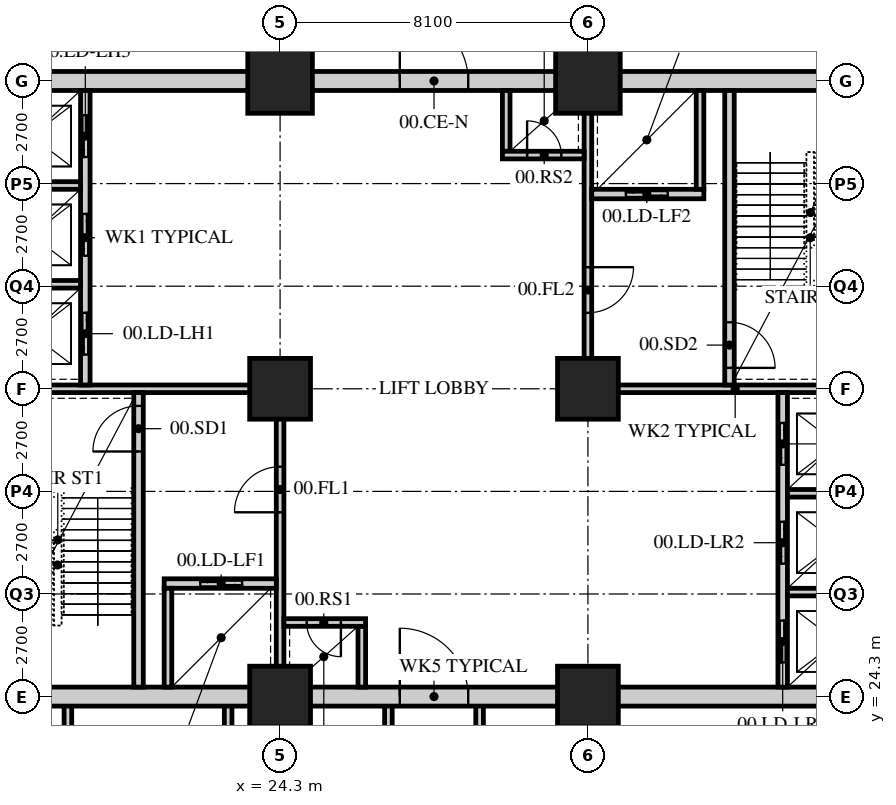
"""IFC4 building model, lengths in metres.
Left out: names, types, materials, properties, quantities, classifications, styles, units other than length and angle.
Written with IfcOpenShell. Run it as: python <this file> out.ifc"""

import sys

from ifc_helpers import new_model, si_unit, direction, frame, frame_2d, origin, origin_2d, place, context, subcontext, project, spatial, rectangle, hollow_rectangle, extrude, element, fill, save


model = new_model("IFC4")
c1 = context("Model", 3, precision=1e-05, world=origin(), true_north=direction((0.0, 1.0)))
c2 = subcontext(c1, "Body", "Model", "MODEL_VIEW")
j1 = project(units=[si_unit("LENGTHUNIT", "METRE"), si_unit("PLANEANGLEUNIT", "RADIAN")], contexts=[c1])
p1 = place(None, origin())
s1 = spatial("IfcSite", under=j1, at=p1, CompositionType="ELEMENT")
p2 = place(p1, origin())
s2 = spatial("IfcBuilding", under=s1, at=p2, CompositionType="ELEMENT")
p3 = place(p2, origin())
s3 = spatial("IfcBuildingStorey", under=s2, at=p3, CompositionType="ELEMENT", Elevation=0.0)
for number, where, z_axis, x_axis in (
    (1, (24.3, 24.3, 0.0), (0.0, 0.0, 1.0), (1.0, 0.0, 0.0)),
    (2, (24.3, 32.4, 0.0), (0.0, 0.0, 1.0), (1.0, 0.0, 0.0)),
):
    element("IfcColumn", number, at=place(p3, frame(where, z_axis=z_axis, x_axis=x_axis)), inside=s3, PredefinedType="COLUMN", context=c2, shape_type="SweptSolid", body=[
        extrude(hollow_rectangle(XDim=1.6, YDim=1.6, WallThickness=0.15, at=origin_2d()), origin(), (0.0, 0.0, 1.0), 6.0),
    ])
p4 = place(p3, frame((24.3, 40.5, 0.0), z_axis=(0.0, 0.0, 1.0), x_axis=(1.0, 0.0, 0.0)))
e3 = element("IfcColumn", 3, at=p4, inside=s3, PredefinedType="COLUMN", context=c2, shape_type="SweptSolid", body=[
    extrude(hollow_rectangle(XDim=1.7, YDim=1.7, WallThickness=0.16, at=origin_2d()), origin(), (0.0, 0.0, 1.0), 6.0),
])
for number, where, z_axis, x_axis in (
    (4, (32.4, 24.3, 0.0), (0.0, 0.0, 1.0), (1.0, 0.0, 0.0)),
    (5, (32.4, 32.4, 0.0), (0.0, 0.0, 1.0), (1.0, 0.0, 0.0)),
):
    element("IfcColumn", number, at=place(p3, frame(where, z_axis=z_axis, x_axis=x_axis)), inside=s3, PredefinedType="COLUMN", context=c2, shape_type="SweptSolid", body=[
        extrude(hollow_rectangle(XDim=1.6, YDim=1.6, WallThickness=0.15, at=origin_2d()), origin(), (0.0, 0.0, 1.0), 6.0),
    ])
p5 = place(p3, frame((32.4, 40.5, 0.0), z_axis=(0.0, 0.0, 1.0), x_axis=(1.0, 0.0, 0.0)))
e6 = element("IfcColumn", 6, at=p5, inside=s3, PredefinedType="COLUMN", context=c2, shape_type="SweptSolid", body=[
    extrude(hollow_rectangle(XDim=1.7, YDim=1.7, WallThickness=0.16, at=origin_2d()), origin(), (0.0, 0.0, 1.0), 6.0),
])
for number, where, z_axis, x_axis in (
    (7, (18.717, 3.6, 0.0), (0.0, 0.0, 1.0), (0.0, 1.0, 0.0)),
    (8, (22.933, 3.6, 0.0), (0.0, 0.0, 1.0), (0.0, 1.0, 0.0)),
    (9, (27.15, 3.6, 0.0), (0.0, 0.0, 1.0), (0.0, 1.0, 0.0)),
    (10, (29.55, 3.6, 0.0), (0.0, 0.0, 1.0), (0.0, 1.0, 0.0)),
):
    element("IfcWall", number, at=place(p3, frame(where, z_axis=z_axis, x_axis=x_axis)), inside=s3, PredefinedType="SOLIDWALL", context=c2, shape_type="SweptSolid", body=[
        extrude(rectangle(XDim=20.7, YDim=0.2, at=frame_2d((10.35, 0.0))), origin(), (0.0, 0.0, 1.0), 5.75),
    ])
p6 = place(p3, frame((15.95, 24.3, 0.0), z_axis=(0.0, 0.0, 1.0), x_axis=(1.0, 0.0, 0.0)))
e11 = element("IfcWall", 11, at=p6, inside=s3, PredefinedType="SOLIDWALL", context=c2, shape_type="SweptSolid", body=[
    extrude(rectangle(XDim=24.8, YDim=0.5, at=frame_2d((12.4, 0.0))), origin(), (0.0, 0.0, 1.0), 5.1),
])
p7 = place(p6, frame((11.5, 0.0, 0.0)))
e12 = element("IfcOpeningElement", 12, at=p7, cuts=e11, PredefinedType="OPENING", context=c2, shape_type="SweptSolid", body=[
    extrude(rectangle(XDim=1.8, YDim=2.4, at=frame_2d((0.9, 1.2))), frame((0.0, 0.26, 0.0), z_axis=(0.0, -1.0, 0.0), x_axis=(1.0, 0.0, 0.0)), (0.0, 0.0, 1.0), 0.52),
])
p8 = place(p3, frame((15.95, 40.5, 0.0), z_axis=(0.0, 0.0, 1.0), x_axis=(1.0, 0.0, 0.0)))
e13 = element("IfcWall", 13, at=p8, inside=s3, PredefinedType="SOLIDWALL", context=c2, shape_type="SweptSolid", body=[
    extrude(rectangle(XDim=24.8, YDim=0.5, at=frame_2d((12.4, 0.0))), origin(), (0.0, 0.0, 1.0), 5.1),
])
p9 = place(p8, frame((11.5, 0.0, 0.0)))
e14 = element("IfcOpeningElement", 14, at=p9, cuts=e13, PredefinedType="OPENING", context=c2, shape_type="SweptSolid", body=[
    extrude(rectangle(XDim=1.8, YDim=2.4, at=frame_2d((0.9, 1.2))), frame((0.0, 0.26, 0.0), z_axis=(0.0, -1.0, 0.0), x_axis=(1.0, 0.0, 0.0)), (0.0, 0.0, 1.0), 0.52),
])
p10 = place(p3, frame((16.45, 32.4, 0.0), z_axis=(0.0, 0.0, 1.0), x_axis=(1.0, 0.0, 0.0)))
e15 = element("IfcWall", 15, at=p10, inside=s3, PredefinedType="SOLIDWALL", context=c2, shape_type="SweptSolid", body=[
    extrude(rectangle(XDim=7.95, YDim=0.2, at=frame_2d((3.975, 0.0))), origin(), (0.0, 0.0, 1.0), 5.05),
])
p11 = place(p3, frame((24.3, 24.55, 0.0), z_axis=(0.0, 0.0, 1.0), x_axis=(0.0, 1.0, 0.0)))
e16 = element("IfcWall", 16, at=p11, inside=s3, PredefinedType="SOLIDWALL", context=c2, shape_type="SweptSolid", body=[
    extrude(rectangle(XDim=7.75, YDim=0.2, at=frame_2d((3.875, 0.0))), origin(), (0.0, 0.0, 1.0), 5.05),
])
p12 = place(p11, frame((4.6, 0.0, 0.0)))
e17 = element("IfcOpeningElement", 17, at=p12, cuts=e16, PredefinedType="OPENING", context=c2, shape_type="SweptSolid", body=[
    extrude(rectangle(XDim=1.2, YDim=2.1, at=frame_2d((0.6, 1.05))), frame((0.0, 0.11, 0.0), z_axis=(0.0, -1.0, 0.0), x_axis=(1.0, 0.0, 0.0)), (0.0, 0.0, 1.0), 0.22),
])
p13 = place(p3, frame((20.575, 24.55, 0.0), z_axis=(0.0, 0.0, 1.0), x_axis=(0.0, 1.0, 0.0)))
e18 = element("IfcWall", 18, at=p13, inside=s3, PredefinedType="SOLIDWALL", context=c2, shape_type="SweptSolid", body=[
    extrude(rectangle(XDim=7.75, YDim=0.25, at=frame_2d((3.875, 0.0))), origin(), (0.0, 0.0, 1.0), 5.75),
])
p14 = place(p13, frame((6.2, 0.0, 0.0)))
e19 = element("IfcOpeningElement", 19, at=p14, cuts=e18, PredefinedType="OPENING", context=c2, shape_type="SweptSolid", body=[
    extrude(rectangle(XDim=1.2, YDim=2.1, at=frame_2d((0.6, 1.05))), frame((0.0, 0.135, 0.0), z_axis=(0.0, -1.0, 0.0), x_axis=(1.0, 0.0, 0.0)), (0.0, 0.0, 1.0), 0.27),
])
p15 = place(p3, frame((21.25, 27.275, 0.0), z_axis=(0.0, 0.0, 1.0), x_axis=(1.0, 0.0, 0.0)))
e20 = element("IfcWall", 20, at=p15, inside=s3, PredefinedType="SOLIDWALL", context=c2, shape_type="SweptSolid", body=[
    extrude(rectangle(XDim=2.95, YDim=0.25, at=frame_2d((1.475, 0.0))), origin(), (0.0, 0.0, 1.0), 5.75),
])
p16 = place(p15, frame((0.95, 0.0, 0.0)))
e21 = element("IfcOpeningElement", 21, at=p16, cuts=e20, PredefinedType="OPENING", context=c2, shape_type="SweptSolid", body=[
    extrude(rectangle(XDim=1.1, YDim=2.4, at=frame_2d((0.55, 1.2))), frame((0.0, 0.135, 0.0), z_axis=(0.0, -1.0, 0.0), x_axis=(1.0, 0.0, 0.0)), (0.0, 0.0, 1.0), 0.27),
])
p17 = place(p3, frame((21.35, 24.55, 0.0), z_axis=(0.0, 0.0, 1.0), x_axis=(0.0, 1.0, 0.0)))
e22 = element("IfcWall", 22, at=p17, inside=s3, PredefinedType="SOLIDWALL", context=c2, shape_type="SweptSolid", body=[
    extrude(rectangle(XDim=2.6, YDim=0.2, at=frame_2d((1.3, 0.0))), origin(), (0.0, 0.0, 1.0), 5.75),
])
p18 = place(p3, frame((19.175, 32.5, 0.0), z_axis=(0.0, 0.0, 1.0), x_axis=(0.0, 1.0, 0.0)))
e23 = element("IfcWall", 23, at=p18, inside=s3, PredefinedType="SOLIDWALL", context=c2, shape_type="SweptSolid", body=[
    extrude(rectangle(XDim=7.75, YDim=0.25, at=frame_2d((3.875, 0.0))), origin(), (0.0, 0.0, 1.0), 5.75),
])
p19 = place(p18, frame((0.8, 0.0, 0.0)))
e24 = element("IfcOpeningElement", 24, at=p19, cuts=e23, PredefinedType="OPENING", context=c2, shape_type="SweptSolid", body=[
    extrude(rectangle(XDim=1.1, YDim=2.4, at=frame_2d((0.55, 1.2))), frame((0.0, 0.135, 0.0), z_axis=(0.0, -1.0, 0.0), x_axis=(1.0, 0.0, 0.0)), (0.0, 0.0, 1.0), 0.27),
])
p20 = place(p18, frame((3.4, 0.0, 0.0)))
e25 = element("IfcOpeningElement", 25, at=p20, cuts=e23, PredefinedType="OPENING", context=c2, shape_type="SweptSolid", body=[
    extrude(rectangle(XDim=1.1, YDim=2.4, at=frame_2d((0.55, 1.2))), frame((0.0, 0.135, 0.0), z_axis=(0.0, -1.0, 0.0), x_axis=(1.0, 0.0, 0.0)), (0.0, 0.0, 1.0), 0.27),
])
p21 = place(p18, frame((6.0, 0.0, 0.0)))
e26 = element("IfcOpeningElement", 26, at=p21, cuts=e23, PredefinedType="OPENING", context=c2, shape_type="SweptSolid", body=[
    extrude(rectangle(XDim=1.1, YDim=2.4, at=frame_2d((0.55, 1.2))), frame((0.0, 0.135, 0.0), z_axis=(0.0, -1.0, 0.0), x_axis=(1.0, 0.0, 0.0)), (0.0, 0.0, 1.0), 0.27),
])
for number, where, z_axis, x_axis in (
    (27, (16.45, 35.15, 0.0), (0.0, 0.0, 1.0), (1.0, 0.0, 0.0)),
    (28, (16.45, 37.75, 0.0), (0.0, 0.0, 1.0), (1.0, 0.0, 0.0)),
):
    element("IfcWall", number, at=place(p3, frame(where, z_axis=z_axis, x_axis=x_axis)), inside=s3, PredefinedType="SOLIDWALL", context=c2, shape_type="SweptSolid", body=[
        extrude(rectangle(XDim=2.6, YDim=0.2, at=frame_2d((1.3, 0.0))), origin(), (0.0, 0.0, 1.0), 5.75),
    ])
p22 = place(p3, frame((26.45, 24.55, 0.0), z_axis=(0.0, 0.0, 1.0), x_axis=(0.0, 1.0, 0.0)))
e29 = element("IfcWall", 29, at=p22, inside=s3, PredefinedType="SOLIDWALL", context=c2, shape_type="SweptSolid", body=[
    extrude(rectangle(XDim=1.6, YDim=0.2, at=frame_2d((0.8, 0.0))), origin(), (0.0, 0.0, 1.0), 5.75),
])
p23 = place(p3, frame((24.4, 26.25, 0.0), z_axis=(0.0, 0.0, 1.0), x_axis=(1.0, 0.0, 0.0)))
e30 = element("IfcWall", 30, at=p23, inside=s3, PredefinedType="SOLIDWALL", context=c2, shape_type="SweptSolid", body=[
    extrude(rectangle(XDim=2.15, YDim=0.2, at=frame_2d((1.075, 0.0))), origin(), (0.0, 0.0, 1.0), 5.75),
])
p24 = place(p23, frame((0.6, 0.0, 0.0)))
e31 = element("IfcOpeningElement", 31, at=p24, cuts=e30, PredefinedType="OPENING", context=c2, shape_type="SweptSolid", body=[
    extrude(rectangle(XDim=0.9, YDim=2.1, at=frame_2d((0.45, 1.05))), frame((0.0, 0.11, 0.0), z_axis=(0.0, -1.0, 0.0), x_axis=(1.0, 0.0, 0.0)), (0.0, 0.0, 1.0), 0.22),
])
p25 = place(p3, frame((32.3, 32.4, 0.0), z_axis=(0.0, 0.0, 1.0), x_axis=(1.0, 0.0, 0.0)))
e32 = element("IfcWall", 32, at=p25, inside=s3, PredefinedType="SOLIDWALL", context=c2, shape_type="SweptSolid", body=[
    extrude(rectangle(XDim=7.95, YDim=0.2, at=frame_2d((3.975, 0.0))), origin(), (0.0, 0.0, 1.0), 5.05),
])
p26 = place(p3, frame((32.4, 32.5, 0.0), z_axis=(0.0, 0.0, 1.0), x_axis=(0.0, 1.0, 0.0)))
e33 = element("IfcWall", 33, at=p26, inside=s3, PredefinedType="SOLIDWALL", context=c2, shape_type="SweptSolid", body=[
    extrude(rectangle(XDim=7.75, YDim=0.2, at=frame_2d((3.875, 0.0))), origin(), (0.0, 0.0, 1.0), 5.05),
])
p27 = place(p26, frame((1.9, 0.0, 0.0)))
e34 = element("IfcOpeningElement", 34, at=p27, cuts=e33, PredefinedType="OPENING", context=c2, shape_type="SweptSolid", body=[
    extrude(rectangle(XDim=1.2, YDim=2.1, at=frame_2d((0.6, 1.05))), frame((0.0, 0.11, 0.0), z_axis=(0.0, -1.0, 0.0), x_axis=(1.0, 0.0, 0.0)), (0.0, 0.0, 1.0), 0.22),
])
p28 = place(p3, frame((37.525, 24.55, 0.0), z_axis=(0.0, 0.0, 1.0), x_axis=(0.0, 1.0, 0.0)))
e35 = element("IfcWall", 35, at=p28, inside=s3, PredefinedType="SOLIDWALL", context=c2, shape_type="SweptSolid", body=[
    extrude(rectangle(XDim=7.75, YDim=0.25, at=frame_2d((3.875, 0.0))), origin(), (0.0, 0.0, 1.0), 5.75),
])
p29 = place(p28, frame((0.65, 0.0, 0.0)))
e36 = element("IfcOpeningElement", 36, at=p29, cuts=e35, PredefinedType="OPENING", context=c2, shape_type="SweptSolid", body=[
    extrude(rectangle(XDim=1.1, YDim=2.4, at=frame_2d((0.55, 1.2))), frame((0.0, 0.135, 0.0), z_axis=(0.0, -1.0, 0.0), x_axis=(1.0, 0.0, 0.0)), (0.0, 0.0, 1.0), 0.27),
])
p30 = place(p28, frame((3.25, 0.0, 0.0)))
e37 = element("IfcOpeningElement", 37, at=p30, cuts=e35, PredefinedType="OPENING", context=c2, shape_type="SweptSolid", body=[
    extrude(rectangle(XDim=1.1, YDim=2.4, at=frame_2d((0.55, 1.2))), frame((0.0, 0.135, 0.0), z_axis=(0.0, -1.0, 0.0), x_axis=(1.0, 0.0, 0.0)), (0.0, 0.0, 1.0), 0.27),
])
p31 = place(p28, frame((5.85, 0.0, 0.0)))
e38 = element("IfcOpeningElement", 38, at=p31, cuts=e35, PredefinedType="OPENING", context=c2, shape_type="SweptSolid", body=[
    extrude(rectangle(XDim=1.1, YDim=2.4, at=frame_2d((0.55, 1.2))), frame((0.0, 0.135, 0.0), z_axis=(0.0, -1.0, 0.0), x_axis=(1.0, 0.0, 0.0)), (0.0, 0.0, 1.0), 0.27),
])
for number, where, z_axis, x_axis in (
    (39, (37.65, 27.05, 0.0), (0.0, 0.0, 1.0), (1.0, 0.0, 0.0)),
    (40, (37.65, 29.65, 0.0), (0.0, 0.0, 1.0), (1.0, 0.0, 0.0)),
):
    element("IfcWall", number, at=place(p3, frame(where, z_axis=z_axis, x_axis=x_axis)), inside=s3, PredefinedType="SOLIDWALL", context=c2, shape_type="SweptSolid", body=[
        extrude(rectangle(XDim=2.6, YDim=0.2, at=frame_2d((1.3, 0.0))), origin(), (0.0, 0.0, 1.0), 5.75),
    ])
p32 = place(p3, frame((36.125, 32.5, 0.0), z_axis=(0.0, 0.0, 1.0), x_axis=(0.0, 1.0, 0.0)))
e41 = element("IfcWall", 41, at=p32, inside=s3, PredefinedType="SOLIDWALL", context=c2, shape_type="SweptSolid", body=[
    extrude(rectangle(XDim=7.75, YDim=0.25, at=frame_2d((3.875, 0.0))), origin(), (0.0, 0.0, 1.0), 5.75),
])
p33 = place(p32, frame((0.45, 0.0, 0.0)))
e42 = element("IfcOpeningElement", 42, at=p33, cuts=e41, PredefinedType="OPENING", context=c2, shape_type="SweptSolid", body=[
    extrude(rectangle(XDim=1.2, YDim=2.1, at=frame_2d((0.6, 1.05))), frame((0.0, 0.135, 0.0), z_axis=(0.0, -1.0, 0.0), x_axis=(1.0, 0.0, 0.0)), (0.0, 0.0, 1.0), 0.27),
])
p34 = place(p3, frame((32.5, 37.525, 0.0), z_axis=(0.0, 0.0, 1.0), x_axis=(1.0, 0.0, 0.0)))
e43 = element("IfcWall", 43, at=p34, inside=s3, PredefinedType="SOLIDWALL", context=c2, shape_type="SweptSolid", body=[
    extrude(rectangle(XDim=2.95, YDim=0.25, at=frame_2d((1.475, 0.0))), origin(), (0.0, 0.0, 1.0), 5.75),
])
p35 = place(p34, frame((0.9, 0.0, 0.0)))
e44 = element("IfcOpeningElement", 44, at=p35, cuts=e43, PredefinedType="OPENING", context=c2, shape_type="SweptSolid", body=[
    extrude(rectangle(XDim=1.1, YDim=2.4, at=frame_2d((0.55, 1.2))), frame((0.0, 0.135, 0.0), z_axis=(0.0, -1.0, 0.0), x_axis=(1.0, 0.0, 0.0)), (0.0, 0.0, 1.0), 0.27),
])
p36 = place(p3, frame((35.35, 37.65, 0.0), z_axis=(0.0, 0.0, 1.0), x_axis=(0.0, 1.0, 0.0)))
e45 = element("IfcWall", 45, at=p36, inside=s3, PredefinedType="SOLIDWALL", context=c2, shape_type="SweptSolid", body=[
    extrude(rectangle(XDim=2.6, YDim=0.2, at=frame_2d((1.3, 0.0))), origin(), (0.0, 0.0, 1.0), 5.75),
])
p37 = place(p3, frame((30.25, 38.65, 0.0), z_axis=(0.0, 0.0, 1.0), x_axis=(0.0, 1.0, 0.0)))
e46 = element("IfcWall", 46, at=p37, inside=s3, PredefinedType="SOLIDWALL", context=c2, shape_type="SweptSolid", body=[
    extrude(rectangle(XDim=1.6, YDim=0.2, at=frame_2d((0.8, 0.0))), origin(), (0.0, 0.0, 1.0), 5.75),
])
p38 = place(p3, frame((30.15, 38.55, 0.0), z_axis=(0.0, 0.0, 1.0), x_axis=(1.0, 0.0, 0.0)))
e47 = element("IfcWall", 47, at=p38, inside=s3, PredefinedType="SOLIDWALL", context=c2, shape_type="SweptSolid", body=[
    extrude(rectangle(XDim=2.15, YDim=0.2, at=frame_2d((1.075, 0.0))), origin(), (0.0, 0.0, 1.0), 5.75),
])
p39 = place(p38, frame((0.65, 0.0, 0.0)))
e48 = element("IfcOpeningElement", 48, at=p39, cuts=e47, PredefinedType="OPENING", context=c2, shape_type="SweptSolid", body=[
    extrude(rectangle(XDim=0.9, YDim=2.1, at=frame_2d((0.45, 1.05))), frame((0.0, 0.11, 0.0), z_axis=(0.0, -1.0, 0.0), x_axis=(1.0, 0.0, 0.0)), (0.0, 0.0, 1.0), 0.22),
])
p40 = place(p14, origin())
e49 = element("IfcDoor", 49, at=p40, inside=s3, OperationType="SINGLE_SWING_LEFT", PredefinedType="DOOR", context=c2, shape_type="SweptSolid", body=[
    extrude(rectangle(XDim=1.2, YDim=2.1, at=frame_2d((0.6, 1.05))), frame((0.0, 0.025, 0.0), z_axis=(0.0, -1.0, 0.0), x_axis=(1.0, 0.0, 0.0)), (0.0, 0.0, 1.0), 0.05),
])
fill(e19, e49)
p41 = place(p12, origin())
e50 = element("IfcDoor", 50, at=p41, inside=s3, OperationType="SINGLE_SWING_LEFT", PredefinedType="DOOR", context=c2, shape_type="SweptSolid", body=[
    extrude(rectangle(XDim=1.2, YDim=2.1, at=frame_2d((0.6, 1.05))), frame((0.0, 0.025, 0.0), z_axis=(0.0, -1.0, 0.0), x_axis=(1.0, 0.0, 0.0)), (0.0, 0.0, 1.0), 0.05),
])
fill(e17, e50)
p42 = place(p24, origin())
e51 = element("IfcDoor", 51, at=p42, inside=s3, OperationType="SINGLE_SWING_LEFT", PredefinedType="DOOR", context=c2, shape_type="SweptSolid", body=[
    extrude(rectangle(XDim=0.9, YDim=2.1, at=frame_2d((0.45, 1.05))), frame((0.0, 0.025, 0.0), z_axis=(0.0, -1.0, 0.0), x_axis=(1.0, 0.0, 0.0)), (0.0, 0.0, 1.0), 0.05),
])
fill(e31, e51)
p43 = place(p33, origin())
e52 = element("IfcDoor", 52, at=p43, inside=s3, OperationType="SINGLE_SWING_RIGHT", PredefinedType="DOOR", context=c2, shape_type="SweptSolid", body=[
    extrude(rectangle(XDim=1.2, YDim=2.1, at=frame_2d((0.6, 1.05))), frame((0.0, 0.025, 0.0), z_axis=(0.0, -1.0, 0.0), x_axis=(1.0, 0.0, 0.0)), (0.0, 0.0, 1.0), 0.05),
])
fill(e42, e52)
p44 = place(p27, origin())
e53 = element("IfcDoor", 53, at=p44, inside=s3, OperationType="SINGLE_SWING_LEFT", PredefinedType="DOOR", context=c2, shape_type="SweptSolid", body=[
    extrude(rectangle(XDim=1.2, YDim=2.1, at=frame_2d((0.6, 1.05))), frame((0.0, 0.025, 0.0), z_axis=(0.0, -1.0, 0.0), x_axis=(1.0, 0.0, 0.0)), (0.0, 0.0, 1.0), 0.05),
])
fill(e34, e53)
p45 = place(p39, origin())
e54 = element("IfcDoor", 54, at=p45, inside=s3, OperationType="SINGLE_SWING_LEFT", PredefinedType="DOOR", context=c2, shape_type="SweptSolid", body=[
    extrude(rectangle(XDim=0.9, YDim=2.1, at=frame_2d((0.45, 1.05))), frame((0.0, 0.025, 0.0), z_axis=(0.0, -1.0, 0.0), x_axis=(1.0, 0.0, 0.0)), (0.0, 0.0, 1.0), 0.05),
])
fill(e48, e54)
p46 = place(p19, origin())
e55 = element("IfcDoor", 55, at=p46, inside=s3, OperationType="DOUBLE_DOOR_SLIDING", PredefinedType="DOOR", context=c2, shape_type="SweptSolid", body=[
    extrude(rectangle(XDim=1.1, YDim=2.4, at=frame_2d((0.55, 1.2))), frame((0.0, 0.025, 0.0), z_axis=(0.0, -1.0, 0.0), x_axis=(1.0, 0.0, 0.0)), (0.0, 0.0, 1.0), 0.05),
])
fill(e24, e55)
p47 = place(p20, origin())
e56 = element("IfcDoor", 56, at=p47, inside=s3, OperationType="DOUBLE_DOOR_SLIDING", PredefinedType="DOOR", context=c2, shape_type="SweptSolid", body=[
    extrude(rectangle(XDim=1.1, YDim=2.4, at=frame_2d((0.55, 1.2))), frame((0.0, 0.025, 0.0), z_axis=(0.0, -1.0, 0.0), x_axis=(1.0, 0.0, 0.0)), (0.0, 0.0, 1.0), 0.05),
])
fill(e25, e56)
p48 = place(p21, origin())
e57 = element("IfcDoor", 57, at=p48, inside=s3, OperationType="DOUBLE_DOOR_SLIDING", PredefinedType="DOOR", context=c2, shape_type="SweptSolid", body=[
    extrude(rectangle(XDim=1.1, YDim=2.4, at=frame_2d((0.55, 1.2))), frame((0.0, 0.025, 0.0), z_axis=(0.0, -1.0, 0.0), x_axis=(1.0, 0.0, 0.0)), (0.0, 0.0, 1.0), 0.05),
])
fill(e26, e57)
p49 = place(p29, origin())
e58 = element("IfcDoor", 58, at=p49, inside=s3, OperationType="DOUBLE_DOOR_SLIDING", PredefinedType="DOOR", context=c2, shape_type="SweptSolid", body=[
    extrude(rectangle(XDim=1.1, YDim=2.4, at=frame_2d((0.55, 1.2))), frame((0.0, 0.025, 0.0), z_axis=(0.0, -1.0, 0.0), x_axis=(1.0, 0.0, 0.0)), (0.0, 0.0, 1.0), 0.05),
])
fill(e36, e58)
p50 = place(p30, origin())
e59 = element("IfcDoor", 59, at=p50, inside=s3, OperationType="DOUBLE_DOOR_SLIDING", PredefinedType="DOOR", context=c2, shape_type="SweptSolid", body=[
    extrude(rectangle(XDim=1.1, YDim=2.4, at=frame_2d((0.55, 1.2))), frame((0.0, 0.025, 0.0), z_axis=(0.0, -1.0, 0.0), x_axis=(1.0, 0.0, 0.0)), (0.0, 0.0, 1.0), 0.05),
])
fill(e37, e59)
p51 = place(p31, origin())
e60 = element("IfcDoor", 60, at=p51, inside=s3, OperationType="DOUBLE_DOOR_SLIDING", PredefinedType="DOOR", context=c2, shape_type="SweptSolid", body=[
    extrude(rectangle(XDim=1.1, YDim=2.4, at=frame_2d((0.55, 1.2))), frame((0.0, 0.025, 0.0), z_axis=(0.0, -1.0, 0.0), x_axis=(1.0, 0.0, 0.0)), (0.0, 0.0, 1.0), 0.05),
])
fill(e38, e60)
p52 = place(p16, origin())
e61 = element("IfcDoor", 61, at=p52, inside=s3, OperationType="DOUBLE_DOOR_SLIDING", PredefinedType="DOOR", context=c2, shape_type="SweptSolid", body=[
    extrude(rectangle(XDim=1.1, YDim=2.4, at=frame_2d((0.55, 1.2))), frame((0.0, 0.025, 0.0), z_axis=(0.0, -1.0, 0.0), x_axis=(1.0, 0.0, 0.0)), (0.0, 0.0, 1.0), 0.05),
])
fill(e21, e61)
p53 = place(p35, origin())
e62 = element("IfcDoor", 62, at=p53, inside=s3, OperationType="DOUBLE_DOOR_SLIDING", PredefinedType="DOOR", context=c2, shape_type="SweptSolid", body=[
    extrude(rectangle(XDim=1.1, YDim=2.4, at=frame_2d((0.55, 1.2))), frame((0.0, 0.025, 0.0), z_axis=(0.0, -1.0, 0.0), x_axis=(1.0, 0.0, 0.0)), (0.0, 0.0, 1.0), 0.05),
])
fill(e44, e62)
p54 = place(p7, origin())
e63 = element("IfcDoor", 63, at=p54, inside=s3, OperationType="DOUBLE_DOOR_SINGLE_SWING", PredefinedType="DOOR", context=c2, shape_type="SweptSolid", body=[
    extrude(rectangle(XDim=1.8, YDim=2.4, at=frame_2d((0.9, 1.2))), frame((0.0, 0.025, 0.0), z_axis=(0.0, -1.0, 0.0), x_axis=(1.0, 0.0, 0.0)), (0.0, 0.0, 1.0), 0.05),
])
fill(e12, e63)
p55 = place(p9, origin())
e64 = element("IfcDoor", 64, at=p55, inside=s3, OperationType="DOUBLE_DOOR_SINGLE_SWING", PredefinedType="DOOR", context=c2, shape_type="SweptSolid", body=[
    extrude(rectangle(XDim=1.8, YDim=2.4, at=frame_2d((0.9, 1.2))), frame((0.0, 0.025, 0.0), z_axis=(0.0, -1.0, 0.0), x_axis=(1.0, 0.0, 0.0)), (0.0, 0.0, 1.0), 0.05),
])
fill(e14, e64)
save(model, sys.argv[1])
